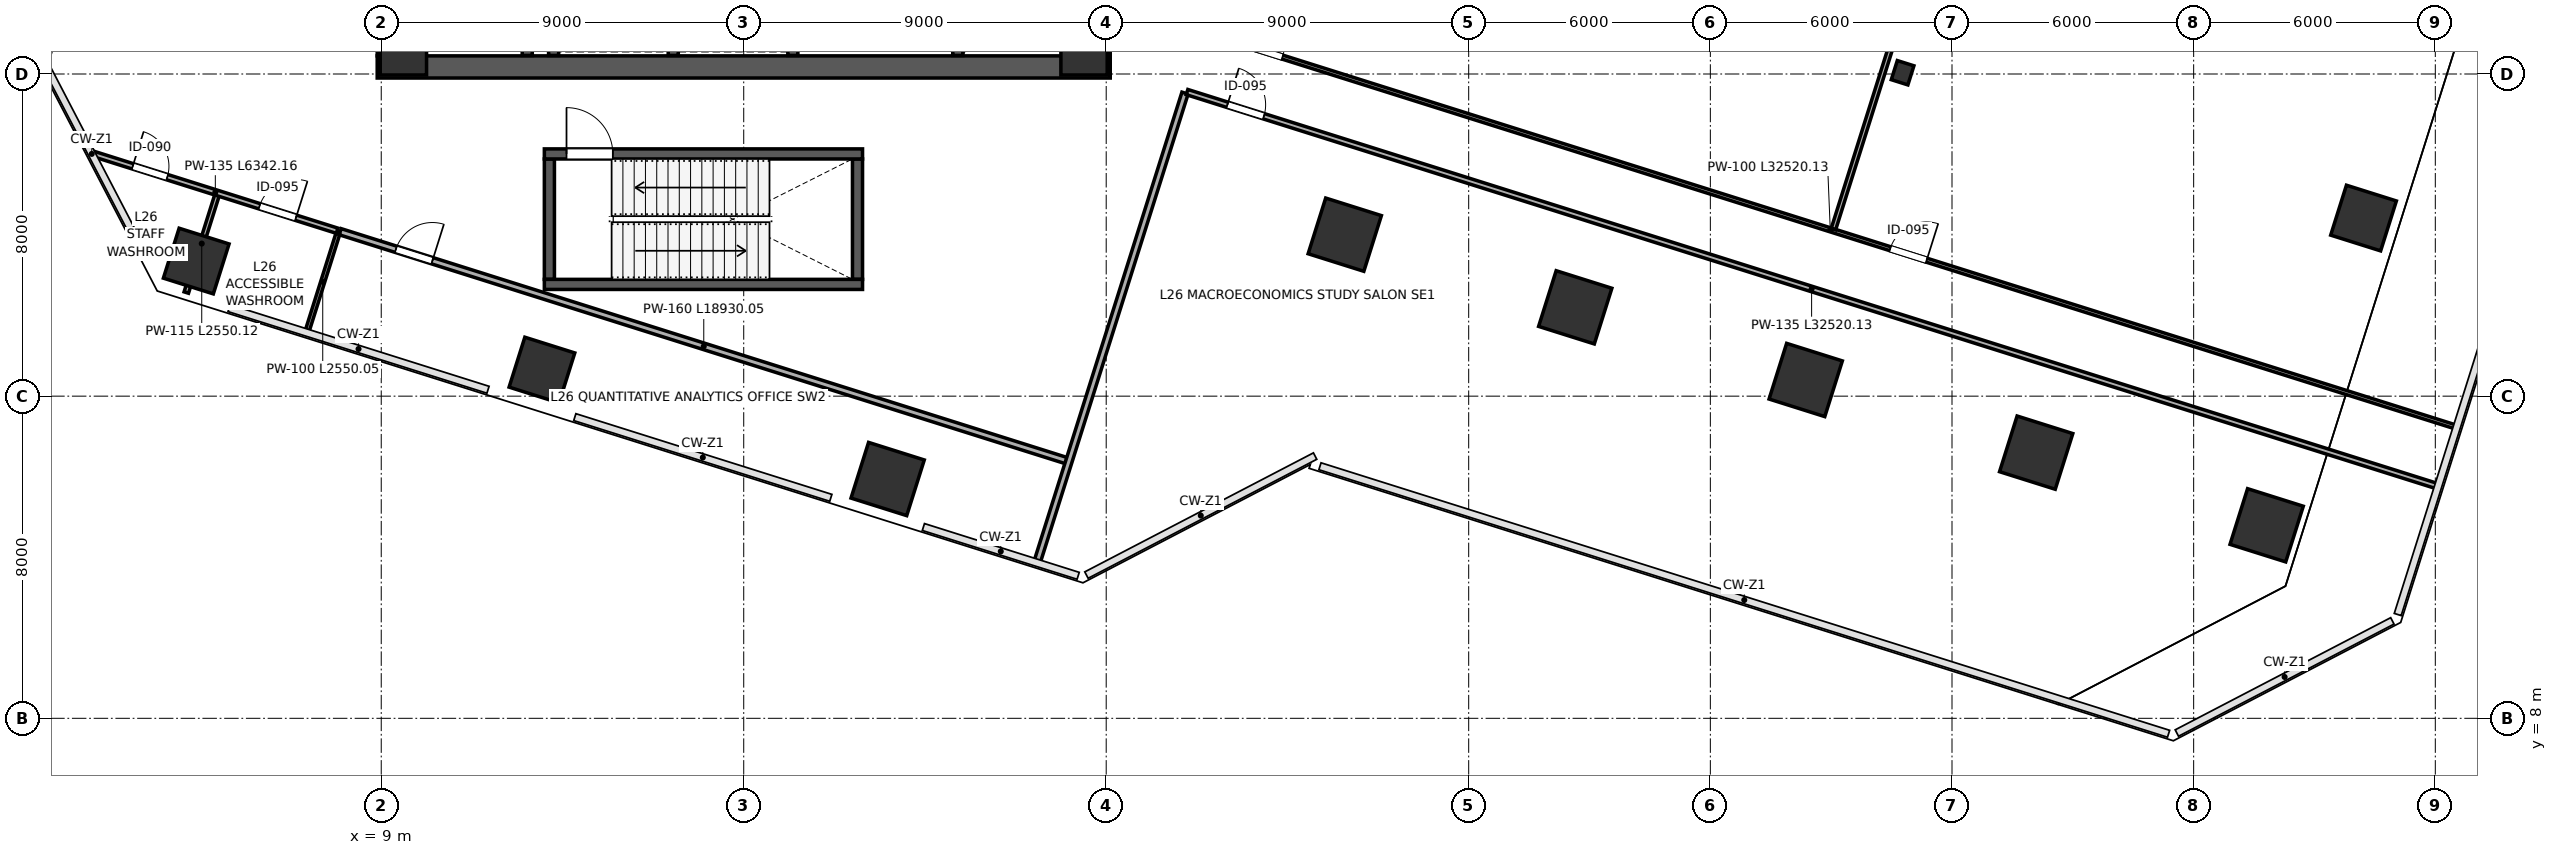
"""IFC4 building model, lengths in metres.
Left out: names, types, materials, properties, quantities, classifications, styles, units other than length and angle.
Written with IfcOpenShell. Run it as: python <this file> out.ifc"""

import sys

from ifc_helpers import new_model, si_unit, direction, frame, frame_2d, origin, origin_2d, place, context, subcontext, project, spatial, rectangle, i_section, extrude, source, transform, mapped, element, fill, save


model = new_model("IFC4")
c1 = context("Model", 3, precision=1e-05, world=origin(), true_north=direction((0.0, 1.0)))
c2 = subcontext(c1, "Body", "Model", "MODEL_VIEW")
j1 = project(units=[si_unit("LENGTHUNIT", "METRE"), si_unit("PLANEANGLEUNIT", "RADIAN")], contexts=[c1])
p1 = place(None, origin())
s1 = spatial("IfcSite", under=j1, at=p1, CompositionType="ELEMENT")
p2 = place(p1, origin())
s2 = spatial("IfcBuilding", under=s1, at=p2, CompositionType="ELEMENT")
p3 = place(p2, frame((0.0, 0.0, 116.8)))
s3 = spatial("IfcBuildingStorey", under=s2, at=p3, CompositionType="ELEMENT", Elevation=116.8)
m1 = source(origin(), c2, "Body", "SweptSolid", [
    extrude(rectangle(XDim=1.15, YDim=1.15, at=origin_2d()), origin(), (0.0, 0.0, 1.0), 5.398),
])
for number, where, z_axis, x_axis in (
    (1, (9.55, 24.55, 0.001), (0.0, 0.0, 1.0), (1.0, 0.0, 0.0)),
    (2, (26.45, 24.55, 0.001), (0.0, 0.0, 1.0), (1.0, 0.0, 0.0)),
):
    element("IfcColumn", number, at=place(p3, frame(where, z_axis=z_axis, x_axis=x_axis)), inside=s3, PredefinedType="COLUMN", context=c2, shape_type="MappedRepresentation", body=[
        mapped(m1, transform((0.0, 0.0, 0.0), scale=1.0)),
    ])
m2 = source(origin(), c2, "Body", "SweptSolid", [
    extrude(rectangle(XDim=1.3, YDim=1.3, at=origin_2d()), origin(), (0.0, 0.0, 1.0), 5.398),
])
for number, where, z_axis, x_axis in (
    (3, (4.406, 19.355, 0.001), (0.0, 0.0, 1.0), (-0.954, 0.301, 0.0)),
    (4, (12.99, 16.648, 0.001), (0.0, 0.0, 1.0), (-0.954, 0.301, 0.0)),
):
    element("IfcColumn", number, at=place(p3, frame(where, z_axis=z_axis, x_axis=x_axis)), inside=s3, PredefinedType="COLUMN", context=c2, shape_type="MappedRepresentation", body=[
        mapped(m2, transform((0.0, 0.0, 0.0), scale=1.0)),
    ])
m3 = source(origin(), c2, "Body", "SweptSolid", [
    extrude(rectangle(XDim=1.45, YDim=1.45, at=origin_2d()), origin(), (0.0, 0.0, 1.0), 5.398),
])
p4 = place(p3, frame((21.573, 13.942, 0.001), z_axis=(0.0, 0.0, 1.0), x_axis=(-0.953716950748, 0.300705799504, 0.0)))
e5 = element("IfcColumn", 5, at=p4, inside=s3, PredefinedType="COLUMN", context=c2, shape_type="MappedRepresentation", body=[
    mapped(m3, transform((0.0, 0.0, 0.0), scale=1.0)),
])
m4 = source(origin(), c2, "Body", "SweptSolid", [
    extrude(rectangle(XDim=1.45, YDim=1.45, at=origin_2d()), origin(), (0.0, 0.0, 1.0), 5.398),
])
for number, where, z_axis, x_axis in (
    (6, (32.923, 20.01, 0.001), (0.0, 0.0, 1.0), (-0.954, 0.301, 0.0)),
    (7, (38.646, 18.206, 0.001), (0.0, 0.0, 1.0), (-0.954, 0.301, 0.0)),
    (8, (44.368, 16.402, 0.001), (0.0, 0.0, 1.0), (-0.954, 0.301, 0.0)),
):
    element("IfcColumn", number, at=place(p3, frame(where, z_axis=z_axis, x_axis=x_axis)), inside=s3, PredefinedType="COLUMN", context=c2, shape_type="MappedRepresentation", body=[
        mapped(m4, transform((0.0, 0.0, 0.0), scale=1.0)),
    ])
m5 = source(origin(), c2, "Body", "SweptSolid", [
    extrude(i_section(OverallWidth=0.432, OverallDepth=0.498, WebThickness=0.056, FlangeThickness=0.089, FilletRadius=0.015, at=origin_2d()), origin(), (0.0, 0.0, 1.0), 5.398),
])
p5 = place(p3, frame((46.773, 24.031, 0.001), z_axis=(0.0, 0.0, 1.0), x_axis=(-0.953716950748, 0.300705799504, 0.0)))
e9 = element("IfcColumn", 9, at=p5, inside=s3, PredefinedType="COLUMN", context=c2, shape_type="MappedRepresentation", body=[
    mapped(m5, transform((0.0, 0.0, 0.0), scale=1.0)),
])
p6 = place(p3, frame((50.09, 14.597, 0.001), z_axis=(0.0, 0.0, 1.0), x_axis=(-0.953716950748, 0.300705799504, 0.0)))
e10 = element("IfcColumn", 10, at=p6, inside=s3, PredefinedType="COLUMN", context=c2, shape_type="MappedRepresentation", body=[
    mapped(m4, transform((0.0, 0.0, 0.0), scale=1.0)),
])
p7 = place(p3, frame((55.812, 12.793, 0.001), z_axis=(0.0, 0.0, 1.0), x_axis=(-0.953716950748, 0.300705799504, 0.0)))
e11 = element("IfcColumn", 11, at=p7, inside=s3, PredefinedType="COLUMN", context=c2, shape_type="MappedRepresentation", body=[
    mapped(m3, transform((0.0, 0.0, 0.0), scale=1.0)),
])
p8 = place(p3, frame((58.218, 20.423, 0.001), z_axis=(0.0, 0.0, 1.0), x_axis=(-0.953716950748, 0.300705799504, 0.0)))
e12 = element("IfcColumn", 12, at=p8, inside=s3, PredefinedType="COLUMN", context=c2, shape_type="MappedRepresentation", body=[
    mapped(m2, transform((0.0, 0.0, 0.0), scale=1.0)),
])
p9 = place(p3, frame((9.175, 24.45, 0.0), z_axis=(0.0, 0.0, 1.0), x_axis=(0.0, 1.0, 0.0)))
e13 = element("IfcWall", 13, at=p9, inside=s3, PredefinedType="SHEAR", context=c2, shape_type="SweptSolid", body=[
    extrude(rectangle(XDim=15.1, YDim=0.55, at=frame_2d((7.55, 0.0))), origin(), (0.0, 0.0, 1.0), 5.12),
])
p10 = place(p3, frame((26.825, 24.45, 0.0), z_axis=(0.0, 0.0, 1.0), x_axis=(0.0, 1.0, 0.0)))
e14 = element("IfcWall", 14, at=p10, inside=s3, PredefinedType="SHEAR", context=c2, shape_type="SweptSolid", body=[
    extrude(rectangle(XDim=15.1, YDim=0.55, at=frame_2d((7.55, 0.0))), origin(), (0.0, 0.0, 1.0), 5.12),
])
p11 = place(p10, frame((8.6, 0.0, 0.0)))
e15 = element("IfcOpeningElement", 15, at=p11, cuts=e14, PredefinedType="OPENING", context=c2, shape_type="SweptSolid", body=[
    extrude(rectangle(XDim=1.15, YDim=2.2, at=frame_2d((0.575, 1.1))), frame((0.0, 0.285, 0.0), z_axis=(0.0, -1.0, 0.0), x_axis=(1.0, 0.0, 0.0)), (0.0, 0.0, 1.0), 0.57),
])
p12 = place(p3, frame((8.9, 24.175, 0.0), z_axis=(0.0, 0.0, 1.0), x_axis=(1.0, 0.0, 0.0)))
e16 = element("IfcWall", 16, at=p12, inside=s3, PredefinedType="SHEAR", context=c2, shape_type="SweptSolid", body=[
    extrude(rectangle(XDim=18.2, YDim=0.55, at=frame_2d((9.1, 0.0))), origin(), (0.0, 0.0, 1.0), 5.12),
])
p13 = place(p3, frame((12.625, 24.46, 0.0), z_axis=(0.0, 0.0, 1.0), x_axis=(0.0, 1.0, 0.0)))
e17 = element("IfcWall", 17, at=p13, inside=s3, PredefinedType="SHEAR", context=c2, shape_type="SweptSolid", body=[
    extrude(rectangle(XDim=7.49, YDim=0.25, at=frame_2d((3.745, 0.0))), origin(), (0.0, 0.0, 1.0), 5.12),
])
p14 = place(p13, frame((5.85, 0.0, 0.0)))
e18 = element("IfcOpeningElement", 18, at=p14, cuts=e17, PredefinedType="OPENING", context=c2, shape_type="SweptSolid", body=[
    extrude(rectangle(XDim=1.15, YDim=2.2, at=frame_2d((0.575, 1.1))), frame((0.0, 0.135, 0.0), z_axis=(0.0, -1.0, 0.0), x_axis=(1.0, 0.0, 0.0)), (0.0, 0.0, 1.0), 0.27),
])
p15 = place(p3, frame((23.315, 24.46, 0.0), z_axis=(0.0, 0.0, 1.0), x_axis=(0.0, 1.0, 0.0)))
e19 = element("IfcWall", 19, at=p15, inside=s3, PredefinedType="SHEAR", context=c2, shape_type="SweptSolid", body=[
    extrude(rectangle(XDim=7.49, YDim=0.25, at=frame_2d((3.745, 0.0))), origin(), (0.0, 0.0, 1.0), 5.12),
])
for number, where, z_axis, x_axis in (
    (20, (13.28, 24.46, 0.0), (0.0, 0.0, 1.0), (0.0, 1.0, 0.0)),
    (21, (16.25, 24.46, 0.0), (0.0, 0.0, 1.0), (0.0, 1.0, 0.0)),
    (22, (19.22, 24.46, 0.0), (0.0, 0.0, 1.0), (0.0, 1.0, 0.0)),
):
    element("IfcWall", number, at=place(p3, frame(where, z_axis=z_axis, x_axis=x_axis)), inside=s3, PredefinedType="SHEAR", context=c2, shape_type="SweptSolid", body=[
        extrude(rectangle(XDim=3.49, YDim=0.25, at=frame_2d((1.745, 0.0))), origin(), (0.0, 0.0, 1.0), 5.12),
    ])
for number, where, z_axis, x_axis in (
    (23, (13.175, 18.9, 0.0), (0.0, 0.0, 1.0), (0.0, 1.0, 0.0)),
    (24, (20.825, 18.9, 0.0), (0.0, 0.0, 1.0), (0.0, 1.0, 0.0)),
):
    element("IfcWall", number, at=place(p3, frame(where, z_axis=z_axis, x_axis=x_axis)), inside=s3, PredefinedType="SHEAR", context=c2, shape_type="SweptSolid", body=[
        extrude(rectangle(XDim=2.99, YDim=0.25, at=frame_2d((1.495, 0.0))), origin(), (0.0, 0.0, 1.0), 5.12),
    ])
p16 = place(p3, frame((13.05, 18.775, 0.0), z_axis=(0.0, 0.0, 1.0), x_axis=(1.0, 0.0, 0.0)))
e25 = element("IfcWall", 25, at=p16, inside=s3, PredefinedType="SHEAR", context=c2, shape_type="SweptSolid", body=[
    extrude(rectangle(XDim=7.9, YDim=0.25, at=frame_2d((3.95, 0.0))), origin(), (0.0, 0.0, 1.0), 5.12),
])
p17 = place(p3, frame((13.05, 22.015, 0.0), z_axis=(0.0, 0.0, 1.0), x_axis=(1.0, 0.0, 0.0)))
e26 = element("IfcWall", 26, at=p17, inside=s3, PredefinedType="SHEAR", context=c2, shape_type="SweptSolid", body=[
    extrude(rectangle(XDim=7.9, YDim=0.25, at=frame_2d((3.95, 0.0))), origin(), (0.0, 0.0, 1.0), 5.12),
])
p18 = place(p17, frame((0.55, 0.0, 0.0)))
e27 = element("IfcOpeningElement", 27, at=p18, cuts=e26, PredefinedType="OPENING", context=c2, shape_type="SweptSolid", body=[
    extrude(rectangle(XDim=1.15, YDim=2.2, at=frame_2d((0.575, 1.1))), frame((0.0, 0.135, 0.0), z_axis=(0.0, -1.0, 0.0), x_axis=(1.0, 0.0, 0.0)), (0.0, 0.0, 1.0), 0.27),
])
p19 = place(p3, frame((4.16, 18.573, 0.0), z_axis=(0.0, 0.0, 1.0), x_axis=(0.300618147946, 0.95374458275, 0.0)))
e28 = element("IfcWall", 28, at=p19, inside=s3, PredefinedType="PARTITIONING", context=c2, shape_type="SweptSolid", body=[
    extrude(rectangle(XDim=2.55, YDim=0.115, at=frame_2d((1.275, 0.0))), origin(), (0.0, 0.0, 1.0), 4.255),
])
p20 = place(p3, frame((7.164, 17.625, 0.0), z_axis=(0.0, 0.0, 1.0), x_axis=(0.300705230461, 0.953717130167, 0.0)))
e29 = element("IfcWall", 29, at=p20, inside=s3, PredefinedType="PARTITIONING", context=c2, shape_type="SweptSolid", body=[
    extrude(rectangle(XDim=2.55, YDim=0.1, at=frame_2d((1.275, 0.0))), origin(), (0.0, 0.0, 1.0), 4.255),
])
p21 = place(p3, frame((1.856, 22.015, 0.0), z_axis=(0.0, 0.0, 1.0), x_axis=(0.953711734195, -0.300722343796, 0.0)))
e30 = element("IfcWall", 30, at=p21, inside=s3, PredefinedType="PARTITIONING", context=c2, shape_type="SweptSolid", body=[
    extrude(rectangle(XDim=6.342, YDim=0.135, at=frame_2d((3.171, 0.0))), origin(), (0.0, 0.0, 1.0), 5.12),
])
p22 = place(p21, frame((1.02, 0.0, 0.0)))
e31 = element("IfcOpeningElement", 31, at=p22, cuts=e30, PredefinedType="OPENING", context=c2, shape_type="SweptSolid", body=[
    extrude(rectangle(XDim=0.9, YDim=2.15, at=frame_2d((0.45, 1.075))), frame((0.0, 0.078, 0.0), z_axis=(0.0, -1.0, 0.0), x_axis=(1.0, 0.0, 0.0)), (0.0, 0.0, 1.0), 0.155),
])
p23 = place(p21, frame((4.32, 0.0, 0.0)))
e32 = element("IfcOpeningElement", 32, at=p23, cuts=e30, PredefinedType="OPENING", context=c2, shape_type="SweptSolid", body=[
    extrude(rectangle(XDim=0.95, YDim=2.15, at=frame_2d((0.475, 1.075))), frame((0.0, 0.078, 0.0), z_axis=(0.0, -1.0, 0.0), x_axis=(1.0, 0.0, 0.0)), (0.0, 0.0, 1.0), 0.155),
])
p24 = place(p3, frame((7.981, 20.084, 0.0), z_axis=(0.0, 0.0, 1.0), x_axis=(0.953717062222, -0.300705445953, 0.0)))
e33 = element("IfcWall", 33, at=p24, inside=s3, PredefinedType="PARTITIONING", context=c2, shape_type="SweptSolid", body=[
    extrude(rectangle(XDim=18.93, YDim=0.16, at=frame_2d((9.465, 0.0))), origin(), (0.0, 0.0, 1.0), 5.12),
])
p25 = place(p24, frame((1.45, 0.0, 0.0)))
e34 = element("IfcOpeningElement", 34, at=p25, cuts=e33, PredefinedType="OPENING", context=c2, shape_type="SweptSolid", body=[
    extrude(rectangle(XDim=0.95, YDim=2.15, at=frame_2d((0.475, 1.075))), frame((0.0, 0.09, 0.0), z_axis=(0.0, -1.0, 0.0), x_axis=(1.0, 0.0, 0.0)), (0.0, 0.0, 1.0), 0.18),
])
p26 = place(p3, frame((25.294, 11.909, 0.0), z_axis=(0.0, 0.0, 1.0), x_axis=(0.300707324156, 0.953716470026, 0.0)))
e35 = element("IfcWall", 35, at=p26, inside=s3, PredefinedType="PARTITIONING", context=c2, shape_type="SweptSolid", body=[
    extrude(rectangle(XDim=12.18, YDim=0.16, at=frame_2d((6.09, 0.0))), origin(), (0.0, 0.0, 1.0), 5.12),
])
p27 = place(p3, frame((29.47, 25.02, 0.0), z_axis=(0.0, 0.0, 1.0), x_axis=(0.953716794744, -0.300706294286, 0.0)))
e36 = element("IfcWall", 36, at=p27, inside=s3, PredefinedType="PARTITIONING", context=c2, shape_type="SweptSolid", body=[
    extrude(rectangle(XDim=32.52, YDim=0.1, at=frame_2d((16.26, 0.0))), origin(), (0.0, 0.0, 1.0), 4.255),
])
p28 = place(p27, frame((1.05, 0.0, 0.0)))
e37 = element("IfcOpeningElement", 37, at=p28, cuts=e36, PredefinedType="OPENING", context=c2, shape_type="SweptSolid", body=[
    extrude(rectangle(XDim=0.95, YDim=2.15, at=frame_2d((0.475, 1.075))), frame((0.0, 0.06, 0.0), z_axis=(0.0, -1.0, 0.0), x_axis=(1.0, 0.0, 0.0)), (0.0, 0.0, 1.0), 0.12),
])
p29 = place(p27, frame((17.82, 0.0, 0.0)))
e38 = element("IfcOpeningElement", 38, at=p29, cuts=e36, PredefinedType="OPENING", context=c2, shape_type="SweptSolid", body=[
    extrude(rectangle(XDim=0.95, YDim=2.15, at=frame_2d((0.475, 1.075))), frame((0.0, 0.06, 0.0), z_axis=(0.0, -1.0, 0.0), x_axis=(1.0, 0.0, 0.0)), (0.0, 0.0, 1.0), 0.12),
])
p30 = place(p3, frame((29.007, 23.552, 0.0), z_axis=(0.0, 0.0, 1.0), x_axis=(0.953718947743, -0.300699465773, 0.0)))
e39 = element("IfcWall", 39, at=p30, inside=s3, PredefinedType="PARTITIONING", context=c2, shape_type="SweptSolid", body=[
    extrude(rectangle(XDim=32.52, YDim=0.135, at=frame_2d((16.26, 0.0))), origin(), (0.0, 0.0, 1.0), 4.255),
])
p31 = place(p30, frame((1.05, 0.0, 0.0)))
e40 = element("IfcOpeningElement", 40, at=p31, cuts=e39, PredefinedType="OPENING", context=c2, shape_type="SweptSolid", body=[
    extrude(rectangle(XDim=0.95, YDim=2.15, at=frame_2d((0.475, 1.075))), frame((0.0, 0.078, 0.0), z_axis=(0.0, -1.0, 0.0), x_axis=(1.0, 0.0, 0.0)), (0.0, 0.0, 1.0), 0.155),
])
p32 = place(p3, frame((45.056, 20.148, 0.0), z_axis=(0.0, 0.0, 1.0), x_axis=(0.300712228368, 0.953714923712, 0.0)))
e41 = element("IfcWall", 41, at=p32, inside=s3, PredefinedType="PARTITIONING", context=c2, shape_type="SweptSolid", body=[
    extrude(rectangle(XDim=20.24, YDim=0.115, at=frame_2d((10.12, 0.0))), origin(), (0.0, 0.0, 1.0), 4.483),
])
m6 = source(origin(), c2, "Body", "SweptSolid", [
    extrude(rectangle(XDim=1.15, YDim=2.2, at=frame_2d((0.575, 1.1))), frame((0.0, 0.025, 0.0), z_axis=(0.0, -1.0, 0.0), x_axis=(1.0, 0.0, 0.0)), (0.0, 0.0, 1.0), 0.05),
])
p33 = place(p18, origin())
e42 = element("IfcDoor", 42, at=p33, inside=s3, OperationType="SINGLE_SWING_LEFT", PredefinedType="DOOR", context=c2, shape_type="MappedRepresentation", body=[
    mapped(m6, transform((0.0, 0.0, 0.0), scale=1.0)),
])
fill(e27, e42)
m7 = source(origin(), c2, "Body", "SweptSolid", [
    extrude(rectangle(XDim=0.9, YDim=2.15, at=frame_2d((0.45, 1.075))), frame((0.0, 0.025, 0.0), z_axis=(0.0, -1.0, 0.0), x_axis=(1.0, 0.0, 0.0)), (0.0, 0.0, 1.0), 0.05),
])
p34 = place(p22, origin())
e43 = element("IfcDoor", 43, at=p34, inside=s3, OperationType="SINGLE_SWING_LEFT", PredefinedType="DOOR", context=c2, shape_type="MappedRepresentation", body=[
    mapped(m7, transform((0.0, 0.0, 0.0), scale=1.0)),
])
fill(e31, e43)
m8 = source(origin(), c2, "Body", "SweptSolid", [
    extrude(rectangle(XDim=0.95, YDim=2.15, at=frame_2d((0.475, 1.075))), frame((0.0, 0.025, 0.0), z_axis=(0.0, -1.0, 0.0), x_axis=(1.0, 0.0, 0.0)), (0.0, 0.0, 1.0), 0.05),
])
p35 = place(p23, origin())
e44 = element("IfcDoor", 44, at=p35, inside=s3, OperationType="SINGLE_SWING_RIGHT", PredefinedType="DOOR", context=c2, shape_type="MappedRepresentation", body=[
    mapped(m8, transform((0.0, 0.0, 0.0), scale=1.0)),
])
fill(e32, e44)
m9 = source(origin(), c2, "Body", "SweptSolid", [
    extrude(rectangle(XDim=0.95, YDim=2.15, at=frame_2d((0.475, 1.075))), frame((0.0, 0.025, 0.0), z_axis=(0.0, -1.0, 0.0), x_axis=(1.0, 0.0, 0.0)), (0.0, 0.0, 1.0), 0.05),
])
p36 = place(p25, origin())
e45 = element("IfcDoor", 45, at=p36, inside=s3, OperationType="SINGLE_SWING_RIGHT", PredefinedType="DOOR", context=c2, shape_type="MappedRepresentation", body=[
    mapped(m9, transform((0.0, 0.0, 0.0), scale=1.0)),
])
fill(e34, e45)
p37 = place(p28, origin())
e46 = element("IfcDoor", 46, at=p37, inside=s3, OperationType="SINGLE_SWING_LEFT", PredefinedType="DOOR", context=c2, shape_type="MappedRepresentation", body=[
    mapped(m8, transform((0.0, 0.0, 0.0), scale=1.0)),
])
fill(e37, e46)
p38 = place(p29, origin())
e47 = element("IfcDoor", 47, at=p38, inside=s3, OperationType="SINGLE_SWING_RIGHT", PredefinedType="DOOR", context=c2, shape_type="MappedRepresentation", body=[
    mapped(m8, transform((0.0, 0.0, 0.0), scale=1.0)),
])
fill(e38, e47)
p39 = place(p31, origin())
e48 = element("IfcDoor", 48, at=p39, inside=s3, OperationType="SINGLE_SWING_LEFT", PredefinedType="DOOR", context=c2, shape_type="MappedRepresentation", body=[
    mapped(m8, transform((0.0, 0.0, 0.0), scale=1.0)),
])
fill(e40, e48)
save(model, sys.argv[1])
